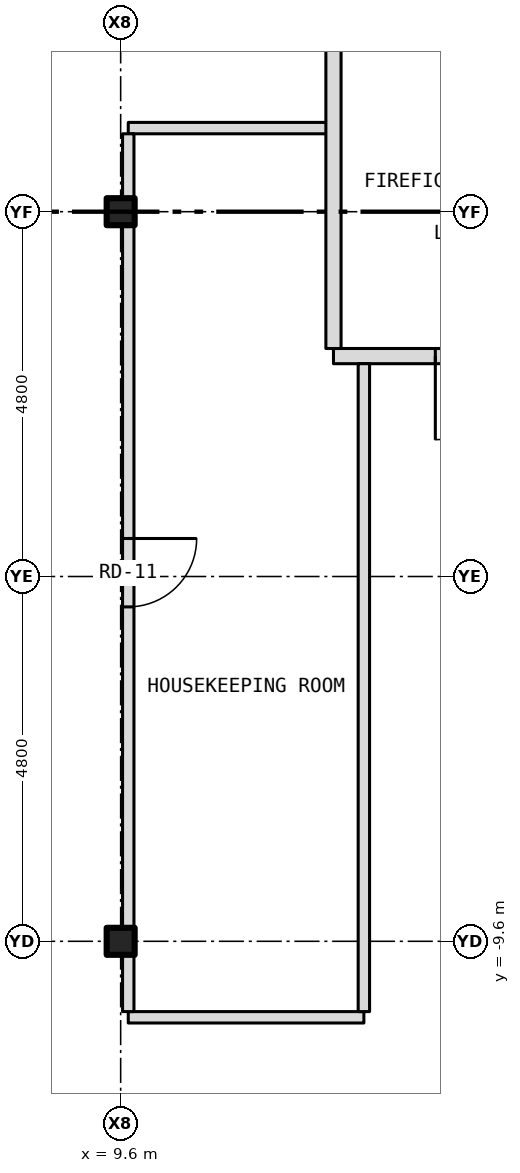
"""IFC4 building model, lengths in metres.
Left out: names, types, materials, properties, quantities, classifications, styles, units other than length and angle.
Written with IfcOpenShell. Run it as: python <this file> out.ifc"""

import sys

from ifc_helpers import new_model, si_unit, direction, frame, frame_2d, origin, origin_2d, place, context, subcontext, project, spatial, rectangle, i_section, extrude, element, fill, save


model = new_model("IFC4")
c1 = context("Model", 3, precision=1e-05, world=origin(), true_north=direction((0.0, 1.0)))
c2 = subcontext(c1, "Body", "Model", "MODEL_VIEW")
j1 = project(units=[si_unit("LENGTHUNIT", "METRE"), si_unit("PLANEANGLEUNIT", "RADIAN")], contexts=[c1])
p1 = place(None, origin())
s1 = spatial("IfcSite", under=j1, at=p1, CompositionType="ELEMENT")
p2 = place(p1, origin())
s2 = spatial("IfcBuilding", under=s1, at=p2, CompositionType="ELEMENT")
p3 = place(p2, frame((0.0, 0.0, 241.0)))
s3 = spatial("IfcBuildingStorey", under=s2, at=p3, CompositionType="ELEMENT", Elevation=241.0)
for number, where, z_axis, x_axis in (
    (1, (9.6, -9.6, -0.15), (0.0, 0.0, 1.0), (1.0, 0.0, 0.0)),
    (2, (9.6, 0.0, -0.15), (0.0, 0.0, 1.0), (1.0, 0.0, 0.0)),
):
    element("IfcColumn", number, at=place(p3, frame(where, z_axis=z_axis, x_axis=x_axis)), inside=s3, PredefinedType="COLUMN", context=c2, shape_type="SweptSolid", body=[
        extrude(i_section(OverallWidth=0.368, OverallDepth=0.356, WebThickness=0.011, FlangeThickness=0.018, at=origin_2d()), origin(), (0.0, 0.0, 1.0), 3.5),
    ])
p4 = place(p3, frame((9.7, -10.6, 0.0), z_axis=(0.0, 0.0, 1.0), x_axis=(1.0, 0.0, 0.0)))
e3 = element("IfcWall", 3, at=p4, inside=s3, PredefinedType="PARTITIONING", context=c2, shape_type="SweptSolid", body=[
    extrude(rectangle(XDim=3.1, YDim=0.15, at=frame_2d((1.55, 0.0))), origin(), (0.0, 0.0, 1.0), 3.35),
])
p5 = place(p3, frame((12.4, -1.9, 0.0), z_axis=(0.0, 0.0, 1.0), x_axis=(1.0, 0.0, 0.0)))
e4 = element("IfcWall", 4, at=p5, inside=s3, PredefinedType="PARTITIONING", context=c2, shape_type="SweptSolid", body=[
    extrude(rectangle(XDim=3.28, YDim=0.2, at=frame_2d((1.64, 0.0))), origin(), (0.0, 0.0, 1.0), 3.35),
])
p6 = place(p5, frame((1.34, 0.0, 0.0)))
e5 = element("IfcOpeningElement", 5, at=p6, cuts=e4, PredefinedType="OPENING", context=c2, shape_type="SweptSolid", body=[
    extrude(rectangle(XDim=1.1, YDim=2.1, at=frame_2d((0.55, 1.05))), frame((0.0, 0.112, 0.0), z_axis=(0.0, -1.0, 0.0), x_axis=(1.0, 0.0, 0.0)), (0.0, 0.0, 1.0), 0.224),
])
p7 = place(p3, frame((9.7, 1.1, 0.0), z_axis=(0.0, 0.0, 1.0), x_axis=(1.0, 0.0, 0.0)))
e6 = element("IfcWall", 6, at=p7, inside=s3, PredefinedType="PARTITIONING", context=c2, shape_type="SweptSolid", body=[
    extrude(rectangle(XDim=2.7, YDim=0.15, at=frame_2d((1.35, 0.0))), origin(), (0.0, 0.0, 1.0), 3.35),
])
p8 = place(p3, frame((9.7, -10.525, 0.0), z_axis=(0.0, 0.0, 1.0), x_axis=(0.0, 1.0, 0.0)))
e7 = element("IfcWall", 7, at=p8, inside=s3, PredefinedType="PARTITIONING", context=c2, shape_type="SweptSolid", body=[
    extrude(rectangle(XDim=0.741, YDim=0.15, at=frame_2d((0.371, 0.0))), origin(), (0.0, 0.0, 1.0), 2.728),
])
p9 = place(p3, frame((9.7, -9.784, 0.0), z_axis=(0.0, 0.0, 1.0), x_axis=(0.0, 1.0, 0.0)))
e8 = element("IfcWall", 8, at=p9, inside=s3, PredefinedType="PARTITIONING", context=c2, shape_type="SweptSolid", body=[
    extrude(rectangle(XDim=0.368, YDim=0.15, at=frame_2d((0.184, 0.0))), origin(), (0.0, 0.0, 1.0), 3.35),
])
p10 = place(p3, frame((9.7, -9.416, 0.0), z_axis=(0.0, 0.0, 1.0), x_axis=(0.0, 1.0, 0.0)))
e9 = element("IfcWall", 9, at=p10, inside=s3, PredefinedType="PARTITIONING", context=c2, shape_type="SweptSolid", body=[
    extrude(rectangle(XDim=9.232, YDim=0.15, at=frame_2d((4.616, 0.0))), origin(), (0.0, 0.0, 1.0), 2.728),
])
p11 = place(p10, frame((4.216, 0.0, 0.0)))
e10 = element("IfcOpeningElement", 10, at=p11, cuts=e9, PredefinedType="OPENING", context=c2, shape_type="SweptSolid", body=[
    extrude(rectangle(XDim=0.9, YDim=2.1, at=frame_2d((0.45, 1.05))), frame((0.0, 0.087, 0.0), z_axis=(0.0, -1.0, 0.0), x_axis=(1.0, 0.0, 0.0)), (0.0, 0.0, 1.0), 0.174),
])
p12 = place(p3, frame((9.7, -0.184, 0.0), z_axis=(0.0, 0.0, 1.0), x_axis=(0.0, 1.0, 0.0)))
e11 = element("IfcWall", 11, at=p12, inside=s3, PredefinedType="PARTITIONING", context=c2, shape_type="SweptSolid", body=[
    extrude(rectangle(XDim=0.368, YDim=0.15, at=frame_2d((0.184, 0.0))), origin(), (0.0, 0.0, 1.0), 3.35),
])
p13 = place(p3, frame((9.7, 0.184, 0.0), z_axis=(0.0, 0.0, 1.0), x_axis=(0.0, 1.0, 0.0)))
e12 = element("IfcWall", 12, at=p13, inside=s3, PredefinedType="PARTITIONING", context=c2, shape_type="SweptSolid", body=[
    extrude(rectangle(XDim=0.841, YDim=0.15, at=frame_2d((0.42, 0.0))), origin(), (0.0, 0.0, 1.0), 2.728),
])
p14 = place(p3, frame((12.4, -1.8, 0.0), z_axis=(0.0, 0.0, 1.0), x_axis=(0.0, 1.0, 0.0)))
e13 = element("IfcWall", 13, at=p14, inside=s3, PredefinedType="PARTITIONING", context=c2, shape_type="SweptSolid", body=[
    extrude(rectangle(XDim=4.0, YDim=0.2, at=frame_2d((2.0, 0.0))), origin(), (0.0, 0.0, 1.0), 3.35),
])
p15 = place(p3, frame((12.8, -10.525, 0.0), z_axis=(0.0, 0.0, 1.0), x_axis=(0.0, 1.0, 0.0)))
e14 = element("IfcWall", 14, at=p15, inside=s3, PredefinedType="PARTITIONING", context=c2, shape_type="SweptSolid", body=[
    extrude(rectangle(XDim=8.525, YDim=0.15, at=frame_2d((4.262, 0.0))), origin(), (0.0, 0.0, 1.0), 3.35),
])
p16 = place(p6, origin())
e15 = element("IfcDoor", 15, at=p16, inside=s3, OperationType="SINGLE_SWING_LEFT", PredefinedType="DOOR", context=c2, shape_type="SweptSolid", body=[
    extrude(rectangle(XDim=1.1, YDim=2.1, at=frame_2d((0.55, 1.05))), frame((0.0, 0.025, 0.0), z_axis=(0.0, -1.0, 0.0), x_axis=(1.0, 0.0, 0.0)), (0.0, 0.0, 1.0), 0.05),
])
fill(e5, e15)
p17 = place(p11, origin())
e16 = element("IfcDoor", 16, at=p17, inside=s3, OperationType="SINGLE_SWING_RIGHT", PredefinedType="DOOR", context=c2, shape_type="SweptSolid", body=[
    extrude(rectangle(XDim=0.9, YDim=2.1, at=frame_2d((0.45, 1.05))), frame((0.0, 0.025, 0.0), z_axis=(0.0, -1.0, 0.0), x_axis=(1.0, 0.0, 0.0)), (0.0, 0.0, 1.0), 0.05),
])
fill(e10, e16)
save(model, sys.argv[1])
